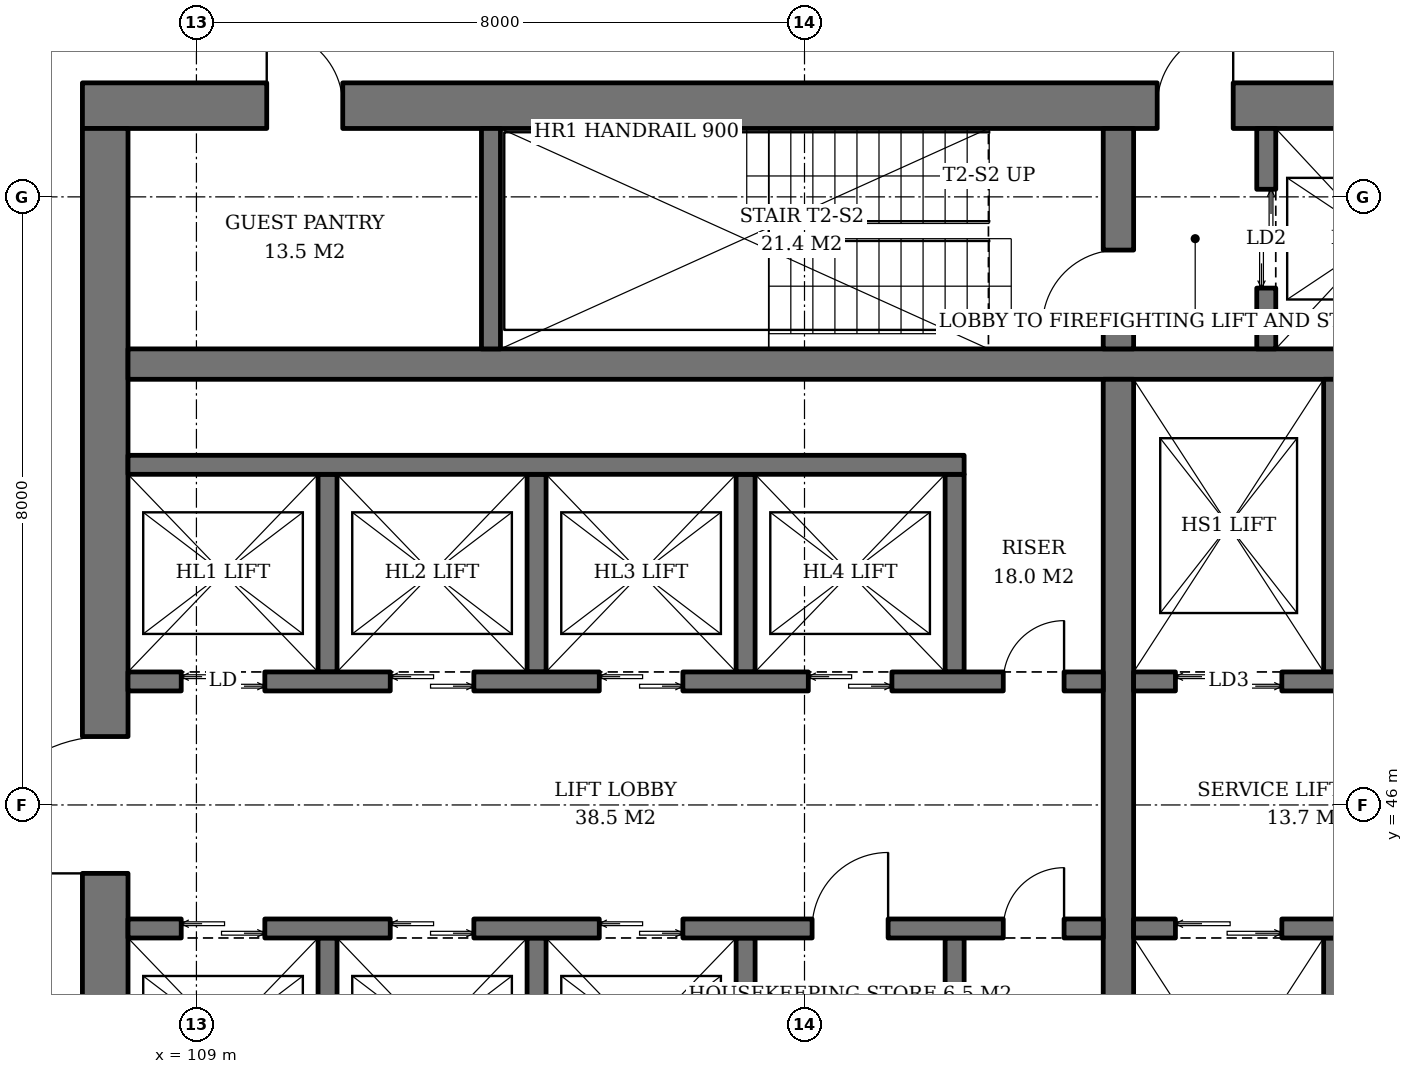
"""IFC4 building model, lengths in metres.
Left out: names, types, materials, properties, quantities, classifications, styles, units other than length and angle.
Written with IfcOpenShell. Run it as: python <this file> out.ifc"""

import sys

from ifc_helpers import new_model, si_unit, direction, frame, frame_2d, origin, place, context, subcontext, project, spatial, rectangle, extrude, element, fill, save


model = new_model("IFC4")
c1 = context("Model", 3, precision=1e-05, world=origin(), true_north=direction((0.0, 1.0)))
c2 = subcontext(c1, "Body", "Model", "MODEL_VIEW")
j1 = project(units=[si_unit("LENGTHUNIT", "METRE"), si_unit("PLANEANGLEUNIT", "RADIAN")], contexts=[c1])
p1 = place(None, origin())
s1 = spatial("IfcSite", under=j1, at=p1, CompositionType="ELEMENT")
p2 = place(p1, origin())
s2 = spatial("IfcBuilding", under=s1, at=p2, CompositionType="ELEMENT")
p3 = place(p2, frame((0.0, 0.0, 59.0)))
s3 = spatial("IfcBuildingStorey", under=s2, at=p3, CompositionType="ELEMENT", Elevation=59.0)
p4 = place(p3, frame((107.5, 55.2, 0.0), z_axis=(0.0, 0.0, 1.0), x_axis=(1.0, 0.0, 0.0)))
e1 = element("IfcWall", 1, at=p4, inside=s3, PredefinedType="SHEAR", context=c2, shape_type="SweptSolid", body=[
    extrude(rectangle(XDim=19.0, YDim=0.6, at=frame_2d((9.5, 0.0))), origin(), (0.0, 0.0, 1.0), 3.8),
])
p5 = place(p4, frame((14.14, 0.0, 0.0)))
e2 = element("IfcOpeningElement", 2, at=p5, cuts=e1, PredefinedType="OPENING", context=c2, shape_type="SweptSolid", body=[
    extrude(rectangle(XDim=1.0, YDim=2.1, at=frame_2d((0.5, 1.05))), frame((0.0, 0.31, 0.0), z_axis=(0.0, -1.0, 0.0), x_axis=(1.0, 0.0, 0.0)), (0.0, 0.0, 1.0), 0.62),
])
p6 = place(p4, frame((2.425, 0.0, 0.0)))
e3 = element("IfcOpeningElement", 3, at=p6, cuts=e1, PredefinedType="OPENING", context=c2, shape_type="SweptSolid", body=[
    extrude(rectangle(XDim=1.0, YDim=2.1, at=frame_2d((0.5, 1.05))), frame((0.0, 0.31, 0.0), z_axis=(0.0, -1.0, 0.0), x_axis=(1.0, 0.0, 0.0)), (0.0, 0.0, 1.0), 0.62),
])
p7 = place(p3, frame((107.8, 37.1, 0.0), z_axis=(0.0, 0.0, 1.0), x_axis=(0.0, 1.0, 0.0)))
e4 = element("IfcWall", 4, at=p7, inside=s3, PredefinedType="SHEAR", context=c2, shape_type="SweptSolid", body=[
    extrude(rectangle(XDim=17.8, YDim=0.6, at=frame_2d((8.9, 0.0))), origin(), (0.0, 0.0, 1.0), 3.8),
])
p8 = place(p7, frame((8.0, 0.0, 0.0)))
e5 = element("IfcOpeningElement", 5, at=p8, cuts=e4, PredefinedType="OPENING", context=c2, shape_type="SweptSolid", body=[
    extrude(rectangle(XDim=1.8, YDim=2.4, at=frame_2d((0.9, 1.2))), frame((0.0, 0.31, 0.0), z_axis=(0.0, -1.0, 0.0), x_axis=(1.0, 0.0, 0.0)), (0.0, 0.0, 1.0), 0.62),
])
p9 = place(p3, frame((108.1, 51.8, 0.0), z_axis=(0.0, 0.0, 1.0), x_axis=(1.0, 0.0, 0.0)))
e6 = element("IfcWall", 6, at=p9, inside=s3, PredefinedType="SHEAR", context=c2, shape_type="SweptSolid", body=[
    extrude(rectangle(XDim=17.8, YDim=0.4, at=frame_2d((8.9, 0.0))), origin(), (0.0, 0.0, 1.0), 3.8),
])
p10 = place(p3, frame((121.13, 40.4, 0.0), z_axis=(0.0, 0.0, 1.0), x_axis=(0.0, 1.0, 0.0)))
e7 = element("IfcWall", 7, at=p10, inside=s3, PredefinedType="SHEAR", context=c2, shape_type="SweptSolid", body=[
    extrude(rectangle(XDim=11.2, YDim=0.4, at=frame_2d((5.6, 0.0))), origin(), (0.0, 0.0, 1.0), 3.8),
])
p11 = place(p3, frame((121.13, 52.0, 0.0), z_axis=(0.0, 0.0, 1.0), x_axis=(0.0, 1.0, 0.0)))
e8 = element("IfcWall", 8, at=p11, inside=s3, PredefinedType="SHEAR", context=c2, shape_type="SweptSolid", body=[
    extrude(rectangle(XDim=2.9, YDim=0.4, at=frame_2d((1.45, 0.0))), origin(), (0.0, 0.0, 1.0), 3.8),
])
p12 = place(p11, frame((0.3, 0.0, 0.0)))
e9 = element("IfcOpeningElement", 9, at=p12, cuts=e8, PredefinedType="OPENING", context=c2, shape_type="SweptSolid", body=[
    extrude(rectangle(XDim=1.0, YDim=2.1, at=frame_2d((0.5, 1.05))), frame((0.0, 0.21, 0.0), z_axis=(0.0, -1.0, 0.0), x_axis=(1.0, 0.0, 0.0)), (0.0, 0.0, 1.0), 0.42),
])
p13 = place(p3, frame((112.875, 52.0, 0.0), z_axis=(0.0, 0.0, 1.0), x_axis=(0.0, 1.0, 0.0)))
e10 = element("IfcWall", 10, at=p13, inside=s3, PredefinedType="SHEAR", context=c2, shape_type="SweptSolid", body=[
    extrude(rectangle(XDim=2.9, YDim=0.25, at=frame_2d((1.45, 0.0))), origin(), (0.0, 0.0, 1.0), 3.8),
])
p14 = place(p3, frame((123.075, 52.0, 0.0), z_axis=(0.0, 0.0, 1.0), x_axis=(0.0, 1.0, 0.0)))
e11 = element("IfcWall", 11, at=p14, inside=s3, PredefinedType="SHEAR", context=c2, shape_type="SweptSolid", body=[
    extrude(rectangle(XDim=2.9, YDim=0.25, at=frame_2d((1.45, 0.0))), origin(), (0.0, 0.0, 1.0), 3.8),
])
p15 = place(p14, frame((0.8, 0.0, 0.0)))
e12 = element("IfcOpeningElement", 12, at=p15, cuts=e11, PredefinedType="OPENING", context=c2, shape_type="SweptSolid", body=[
    extrude(rectangle(XDim=1.3, YDim=2.2, at=frame_2d((0.65, 1.1))), frame((0.0, 0.135, 0.0), z_axis=(0.0, -1.0, 0.0), x_axis=(1.0, 0.0, 0.0)), (0.0, 0.0, 1.0), 0.27),
])
for number, where, z_axis, x_axis in (
    (13, (110.725, 47.75, 0.0), (0.0, 0.0, 1.0), (0.0, 1.0, 0.0)),
    (14, (113.475, 47.75, 0.0), (0.0, 0.0, 1.0), (0.0, 1.0, 0.0)),
    (15, (116.225, 47.75, 0.0), (0.0, 0.0, 1.0), (0.0, 1.0, 0.0)),
    (16, (118.975, 47.75, 0.0), (0.0, 0.0, 1.0), (0.0, 1.0, 0.0)),
):
    element("IfcWall", number, at=place(p3, frame(where, z_axis=z_axis, x_axis=x_axis)), inside=s3, PredefinedType="SHEAR", context=c2, shape_type="SweptSolid", body=[
        extrude(rectangle(XDim=2.6, YDim=0.25, at=frame_2d((1.3, 0.0))), origin(), (0.0, 0.0, 1.0), 3.8),
    ])
p16 = place(p3, frame((108.1, 50.475, 0.0), z_axis=(0.0, 0.0, 1.0), x_axis=(1.0, 0.0, 0.0)))
e17 = element("IfcWall", 17, at=p16, inside=s3, PredefinedType="SHEAR", context=c2, shape_type="SweptSolid", body=[
    extrude(rectangle(XDim=11.0, YDim=0.25, at=frame_2d((5.5, 0.0))), origin(), (0.0, 0.0, 1.0), 3.8),
])
p17 = place(p3, frame((108.1, 47.625, 0.0), z_axis=(0.0, 0.0, 1.0), x_axis=(1.0, 0.0, 0.0)))
e18 = element("IfcWall", 18, at=p17, inside=s3, PredefinedType="SHEAR", context=c2, shape_type="SweptSolid", body=[
    extrude(rectangle(XDim=12.83, YDim=0.25, at=frame_2d((6.415, 0.0))), origin(), (0.0, 0.0, 1.0), 3.8),
])
p18 = place(p17, frame((0.7, 0.0, 0.0)))
e19 = element("IfcOpeningElement", 19, at=p18, cuts=e18, PredefinedType="OPENING", context=c2, shape_type="SweptSolid", body=[
    extrude(rectangle(XDim=1.1, YDim=2.2, at=frame_2d((0.55, 1.1))), frame((0.0, 0.135, 0.0), z_axis=(0.0, -1.0, 0.0), x_axis=(1.0, 0.0, 0.0)), (0.0, 0.0, 1.0), 0.27),
])
p19 = place(p17, frame((3.45, 0.0, 0.0)))
e20 = element("IfcOpeningElement", 20, at=p19, cuts=e18, PredefinedType="OPENING", context=c2, shape_type="SweptSolid", body=[
    extrude(rectangle(XDim=1.1, YDim=2.2, at=frame_2d((0.55, 1.1))), frame((0.0, 0.135, 0.0), z_axis=(0.0, -1.0, 0.0), x_axis=(1.0, 0.0, 0.0)), (0.0, 0.0, 1.0), 0.27),
])
p20 = place(p17, frame((6.2, 0.0, 0.0)))
e21 = element("IfcOpeningElement", 21, at=p20, cuts=e18, PredefinedType="OPENING", context=c2, shape_type="SweptSolid", body=[
    extrude(rectangle(XDim=1.1, YDim=2.2, at=frame_2d((0.55, 1.1))), frame((0.0, 0.135, 0.0), z_axis=(0.0, -1.0, 0.0), x_axis=(1.0, 0.0, 0.0)), (0.0, 0.0, 1.0), 0.27),
])
p21 = place(p17, frame((8.95, 0.0, 0.0)))
e22 = element("IfcOpeningElement", 22, at=p21, cuts=e18, PredefinedType="OPENING", context=c2, shape_type="SweptSolid", body=[
    extrude(rectangle(XDim=1.1, YDim=2.2, at=frame_2d((0.55, 1.1))), frame((0.0, 0.135, 0.0), z_axis=(0.0, -1.0, 0.0), x_axis=(1.0, 0.0, 0.0)), (0.0, 0.0, 1.0), 0.27),
])
p22 = place(p17, frame((11.515, 0.0, 0.0)))
e23 = element("IfcOpeningElement", 23, at=p22, cuts=e18, PredefinedType="OPENING", context=c2, shape_type="SweptSolid", body=[
    extrude(rectangle(XDim=0.8, YDim=2.0, at=frame_2d((0.4, 1.0))), frame((0.0, 0.135, 0.0), z_axis=(0.0, -1.0, 0.0), x_axis=(1.0, 0.0, 0.0)), (0.0, 0.0, 1.0), 0.27),
])
for number, where, z_axis, x_axis in (
    (24, (110.725, 44.25, 0.0), (0.0, 0.0, 1.0), (0.0, -1.0, 0.0)),
    (25, (113.475, 44.25, 0.0), (0.0, 0.0, 1.0), (0.0, -1.0, 0.0)),
    (26, (116.225, 44.25, 0.0), (0.0, 0.0, 1.0), (0.0, -1.0, 0.0)),
    (27, (118.975, 44.25, 0.0), (0.0, 0.0, 1.0), (0.0, -1.0, 0.0)),
):
    element("IfcWall", number, at=place(p3, frame(where, z_axis=z_axis, x_axis=x_axis)), inside=s3, PredefinedType="SHEAR", context=c2, shape_type="SweptSolid", body=[
        extrude(rectangle(XDim=2.6, YDim=0.25, at=frame_2d((1.3, 0.0))), origin(), (0.0, 0.0, 1.0), 3.8),
    ])
p23 = place(p3, frame((108.1, 44.375, 0.0), z_axis=(0.0, 0.0, 1.0), x_axis=(1.0, 0.0, 0.0)))
e28 = element("IfcWall", 28, at=p23, inside=s3, PredefinedType="SHEAR", context=c2, shape_type="SweptSolid", body=[
    extrude(rectangle(XDim=12.83, YDim=0.25, at=frame_2d((6.415, 0.0))), origin(), (0.0, 0.0, 1.0), 3.8),
])
p24 = place(p23, frame((0.7, 0.0, 0.0)))
e29 = element("IfcOpeningElement", 29, at=p24, cuts=e28, PredefinedType="OPENING", context=c2, shape_type="SweptSolid", body=[
    extrude(rectangle(XDim=1.1, YDim=2.2, at=frame_2d((0.55, 1.1))), frame((0.0, 0.135, 0.0), z_axis=(0.0, -1.0, 0.0), x_axis=(1.0, 0.0, 0.0)), (0.0, 0.0, 1.0), 0.27),
])
p25 = place(p23, frame((3.45, 0.0, 0.0)))
e30 = element("IfcOpeningElement", 30, at=p25, cuts=e28, PredefinedType="OPENING", context=c2, shape_type="SweptSolid", body=[
    extrude(rectangle(XDim=1.1, YDim=2.2, at=frame_2d((0.55, 1.1))), frame((0.0, 0.135, 0.0), z_axis=(0.0, -1.0, 0.0), x_axis=(1.0, 0.0, 0.0)), (0.0, 0.0, 1.0), 0.27),
])
p26 = place(p23, frame((6.2, 0.0, 0.0)))
e31 = element("IfcOpeningElement", 31, at=p26, cuts=e28, PredefinedType="OPENING", context=c2, shape_type="SweptSolid", body=[
    extrude(rectangle(XDim=1.1, YDim=2.2, at=frame_2d((0.55, 1.1))), frame((0.0, 0.135, 0.0), z_axis=(0.0, -1.0, 0.0), x_axis=(1.0, 0.0, 0.0)), (0.0, 0.0, 1.0), 0.27),
])
p27 = place(p23, frame((9.0, 0.0, 0.0)))
e32 = element("IfcOpeningElement", 32, at=p27, cuts=e28, PredefinedType="OPENING", context=c2, shape_type="SweptSolid", body=[
    extrude(rectangle(XDim=1.0, YDim=2.1, at=frame_2d((0.5, 1.05))), frame((0.0, 0.135, 0.0), z_axis=(0.0, -1.0, 0.0), x_axis=(1.0, 0.0, 0.0)), (0.0, 0.0, 1.0), 0.27),
])
p28 = place(p23, frame((11.515, 0.0, 0.0)))
e33 = element("IfcOpeningElement", 33, at=p28, cuts=e28, PredefinedType="OPENING", context=c2, shape_type="SweptSolid", body=[
    extrude(rectangle(XDim=0.8, YDim=2.0, at=frame_2d((0.4, 1.0))), frame((0.0, 0.135, 0.0), z_axis=(0.0, -1.0, 0.0), x_axis=(1.0, 0.0, 0.0)), (0.0, 0.0, 1.0), 0.27),
])
p29 = place(p3, frame((123.955, 47.75, 0.0), z_axis=(0.0, 0.0, 1.0), x_axis=(0.0, 1.0, 0.0)))
e34 = element("IfcWall", 34, at=p29, inside=s3, PredefinedType="SHEAR", context=c2, shape_type="SweptSolid", body=[
    extrude(rectangle(XDim=3.85, YDim=0.25, at=frame_2d((1.925, 0.0))), origin(), (0.0, 0.0, 1.0), 3.8),
])
p30 = place(p3, frame((121.33, 47.625, 0.0), z_axis=(0.0, 0.0, 1.0), x_axis=(1.0, 0.0, 0.0)))
e35 = element("IfcWall", 35, at=p30, inside=s3, PredefinedType="SHEAR", context=c2, shape_type="SweptSolid", body=[
    extrude(rectangle(XDim=4.57, YDim=0.25, at=frame_2d((2.285, 0.0))), origin(), (0.0, 0.0, 1.0), 3.8),
])
p31 = place(p30, frame((0.55, 0.0, 0.0)))
e36 = element("IfcOpeningElement", 36, at=p31, cuts=e35, PredefinedType="OPENING", context=c2, shape_type="SweptSolid", body=[
    extrude(rectangle(XDim=1.4, YDim=2.4, at=frame_2d((0.7, 1.2))), frame((0.0, 0.135, 0.0), z_axis=(0.0, -1.0, 0.0), x_axis=(1.0, 0.0, 0.0)), (0.0, 0.0, 1.0), 0.27),
])
p32 = place(p30, frame((3.26, 0.0, 0.0)))
e37 = element("IfcOpeningElement", 37, at=p32, cuts=e35, PredefinedType="OPENING", context=c2, shape_type="SweptSolid", body=[
    extrude(rectangle(XDim=0.8, YDim=2.0, at=frame_2d((0.4, 1.0))), frame((0.0, 0.135, 0.0), z_axis=(0.0, -1.0, 0.0), x_axis=(1.0, 0.0, 0.0)), (0.0, 0.0, 1.0), 0.27),
])
p33 = place(p3, frame((123.955, 44.25, 0.0), z_axis=(0.0, 0.0, 1.0), x_axis=(0.0, -1.0, 0.0)))
e38 = element("IfcWall", 38, at=p33, inside=s3, PredefinedType="SHEAR", context=c2, shape_type="SweptSolid", body=[
    extrude(rectangle(XDim=3.85, YDim=0.25, at=frame_2d((1.925, 0.0))), origin(), (0.0, 0.0, 1.0), 3.8),
])
p34 = place(p3, frame((121.33, 44.375, 0.0), z_axis=(0.0, 0.0, 1.0), x_axis=(1.0, 0.0, 0.0)))
e39 = element("IfcWall", 39, at=p34, inside=s3, PredefinedType="SHEAR", context=c2, shape_type="SweptSolid", body=[
    extrude(rectangle(XDim=4.57, YDim=0.25, at=frame_2d((2.285, 0.0))), origin(), (0.0, 0.0, 1.0), 3.8),
])
p35 = place(p34, frame((0.55, 0.0, 0.0)))
e40 = element("IfcOpeningElement", 40, at=p35, cuts=e39, PredefinedType="OPENING", context=c2, shape_type="SweptSolid", body=[
    extrude(rectangle(XDim=1.4, YDim=2.4, at=frame_2d((0.7, 1.2))), frame((0.0, 0.135, 0.0), z_axis=(0.0, -1.0, 0.0), x_axis=(1.0, 0.0, 0.0)), (0.0, 0.0, 1.0), 0.27),
])
p36 = place(p34, frame((3.26, 0.0, 0.0)))
e41 = element("IfcOpeningElement", 41, at=p36, cuts=e39, PredefinedType="OPENING", context=c2, shape_type="SweptSolid", body=[
    extrude(rectangle(XDim=0.8, YDim=2.0, at=frame_2d((0.4, 1.0))), frame((0.0, 0.135, 0.0), z_axis=(0.0, -1.0, 0.0), x_axis=(1.0, 0.0, 0.0)), (0.0, 0.0, 1.0), 0.27),
])
p37 = place(p15, origin())
e42 = element("IfcDoor", 42, at=p37, inside=s3, OperationType="DOUBLE_DOOR_SLIDING", PredefinedType="DOOR", context=c2, shape_type="SweptSolid", body=[
    extrude(rectangle(XDim=1.3, YDim=2.2, at=frame_2d((0.65, 1.1))), frame((0.0, 0.025, 0.0), z_axis=(0.0, -1.0, 0.0), x_axis=(1.0, 0.0, 0.0)), (0.0, 0.0, 1.0), 0.05),
])
fill(e12, e42)
p38 = place(p18, origin())
e43 = element("IfcDoor", 43, at=p38, inside=s3, OperationType="DOUBLE_DOOR_SLIDING", PredefinedType="DOOR", context=c2, shape_type="SweptSolid", body=[
    extrude(rectangle(XDim=1.1, YDim=2.2, at=frame_2d((0.55, 1.1))), frame((0.0, 0.025, 0.0), z_axis=(0.0, -1.0, 0.0), x_axis=(1.0, 0.0, 0.0)), (0.0, 0.0, 1.0), 0.05),
])
fill(e19, e43)
p39 = place(p19, origin())
e44 = element("IfcDoor", 44, at=p39, inside=s3, OperationType="DOUBLE_DOOR_SLIDING", PredefinedType="DOOR", context=c2, shape_type="SweptSolid", body=[
    extrude(rectangle(XDim=1.1, YDim=2.2, at=frame_2d((0.55, 1.1))), frame((0.0, 0.025, 0.0), z_axis=(0.0, -1.0, 0.0), x_axis=(1.0, 0.0, 0.0)), (0.0, 0.0, 1.0), 0.05),
])
fill(e20, e44)
p40 = place(p20, origin())
e45 = element("IfcDoor", 45, at=p40, inside=s3, OperationType="DOUBLE_DOOR_SLIDING", PredefinedType="DOOR", context=c2, shape_type="SweptSolid", body=[
    extrude(rectangle(XDim=1.1, YDim=2.2, at=frame_2d((0.55, 1.1))), frame((0.0, 0.025, 0.0), z_axis=(0.0, -1.0, 0.0), x_axis=(1.0, 0.0, 0.0)), (0.0, 0.0, 1.0), 0.05),
])
fill(e21, e45)
p41 = place(p21, origin())
e46 = element("IfcDoor", 46, at=p41, inside=s3, OperationType="DOUBLE_DOOR_SLIDING", PredefinedType="DOOR", context=c2, shape_type="SweptSolid", body=[
    extrude(rectangle(XDim=1.1, YDim=2.2, at=frame_2d((0.55, 1.1))), frame((0.0, 0.025, 0.0), z_axis=(0.0, -1.0, 0.0), x_axis=(1.0, 0.0, 0.0)), (0.0, 0.0, 1.0), 0.05),
])
fill(e22, e46)
p42 = place(p22, origin())
e47 = element("IfcDoor", 47, at=p42, inside=s3, OperationType="SINGLE_SWING_RIGHT", PredefinedType="DOOR", context=c2, shape_type="SweptSolid", body=[
    extrude(rectangle(XDim=0.8, YDim=2.0, at=frame_2d((0.4, 1.0))), frame((0.0, 0.025, 0.0), z_axis=(0.0, -1.0, 0.0), x_axis=(1.0, 0.0, 0.0)), (0.0, 0.0, 1.0), 0.05),
])
fill(e23, e47)
p43 = place(p24, origin())
e48 = element("IfcDoor", 48, at=p43, inside=s3, OperationType="DOUBLE_DOOR_SLIDING", PredefinedType="DOOR", context=c2, shape_type="SweptSolid", body=[
    extrude(rectangle(XDim=1.1, YDim=2.2, at=frame_2d((0.55, 1.1))), frame((0.0, 0.025, 0.0), z_axis=(0.0, -1.0, 0.0), x_axis=(1.0, 0.0, 0.0)), (0.0, 0.0, 1.0), 0.05),
])
fill(e29, e48)
p44 = place(p25, origin())
e49 = element("IfcDoor", 49, at=p44, inside=s3, OperationType="DOUBLE_DOOR_SLIDING", PredefinedType="DOOR", context=c2, shape_type="SweptSolid", body=[
    extrude(rectangle(XDim=1.1, YDim=2.2, at=frame_2d((0.55, 1.1))), frame((0.0, 0.025, 0.0), z_axis=(0.0, -1.0, 0.0), x_axis=(1.0, 0.0, 0.0)), (0.0, 0.0, 1.0), 0.05),
])
fill(e30, e49)
p45 = place(p26, origin())
e50 = element("IfcDoor", 50, at=p45, inside=s3, OperationType="DOUBLE_DOOR_SLIDING", PredefinedType="DOOR", context=c2, shape_type="SweptSolid", body=[
    extrude(rectangle(XDim=1.1, YDim=2.2, at=frame_2d((0.55, 1.1))), frame((0.0, 0.025, 0.0), z_axis=(0.0, -1.0, 0.0), x_axis=(1.0, 0.0, 0.0)), (0.0, 0.0, 1.0), 0.05),
])
fill(e31, e50)
p46 = place(p27, origin())
e51 = element("IfcDoor", 51, at=p46, inside=s3, OperationType="SINGLE_SWING_RIGHT", PredefinedType="DOOR", context=c2, shape_type="SweptSolid", body=[
    extrude(rectangle(XDim=1.0, YDim=2.1, at=frame_2d((0.5, 1.05))), frame((0.0, 0.025, 0.0), z_axis=(0.0, -1.0, 0.0), x_axis=(1.0, 0.0, 0.0)), (0.0, 0.0, 1.0), 0.05),
])
fill(e32, e51)
p47 = place(p28, origin())
e52 = element("IfcDoor", 52, at=p47, inside=s3, OperationType="SINGLE_SWING_RIGHT", PredefinedType="DOOR", context=c2, shape_type="SweptSolid", body=[
    extrude(rectangle(XDim=0.8, YDim=2.0, at=frame_2d((0.4, 1.0))), frame((0.0, 0.025, 0.0), z_axis=(0.0, -1.0, 0.0), x_axis=(1.0, 0.0, 0.0)), (0.0, 0.0, 1.0), 0.05),
])
fill(e33, e52)
p48 = place(p31, origin())
e53 = element("IfcDoor", 53, at=p48, inside=s3, OperationType="DOUBLE_DOOR_SLIDING", PredefinedType="DOOR", context=c2, shape_type="SweptSolid", body=[
    extrude(rectangle(XDim=1.4, YDim=2.4, at=frame_2d((0.7, 1.2))), frame((0.0, 0.025, 0.0), z_axis=(0.0, -1.0, 0.0), x_axis=(1.0, 0.0, 0.0)), (0.0, 0.0, 1.0), 0.05),
])
fill(e36, e53)
p49 = place(p35, origin())
e54 = element("IfcDoor", 54, at=p49, inside=s3, OperationType="DOUBLE_DOOR_SLIDING", PredefinedType="DOOR", context=c2, shape_type="SweptSolid", body=[
    extrude(rectangle(XDim=1.4, YDim=2.4, at=frame_2d((0.7, 1.2))), frame((0.0, 0.025, 0.0), z_axis=(0.0, -1.0, 0.0), x_axis=(1.0, 0.0, 0.0)), (0.0, 0.0, 1.0), 0.05),
])
fill(e40, e54)
p50 = place(p12, origin())
e55 = element("IfcDoor", 55, at=p50, inside=s3, OperationType="SINGLE_SWING_LEFT", PredefinedType="DOOR", context=c2, shape_type="SweptSolid", body=[
    extrude(rectangle(XDim=1.0, YDim=2.1, at=frame_2d((0.5, 1.05))), frame((0.0, 0.025, 0.0), z_axis=(0.0, -1.0, 0.0), x_axis=(1.0, 0.0, 0.0)), (0.0, 0.0, 1.0), 0.05),
])
fill(e9, e55)
p51 = place(p5, origin())
e56 = element("IfcDoor", 56, at=p51, inside=s3, OperationType="SINGLE_SWING_RIGHT", PredefinedType="DOOR", context=c2, shape_type="SweptSolid", body=[
    extrude(rectangle(XDim=1.0, YDim=2.1, at=frame_2d((0.5, 1.05))), frame((0.0, 0.025, 0.0), z_axis=(0.0, -1.0, 0.0), x_axis=(1.0, 0.0, 0.0)), (0.0, 0.0, 1.0), 0.05),
])
fill(e2, e56)
p52 = place(p8, origin())
e57 = element("IfcDoor", 57, at=p52, inside=s3, OperationType="DOUBLE_DOOR_SINGLE_SWING", PredefinedType="DOOR", context=c2, shape_type="SweptSolid", body=[
    extrude(rectangle(XDim=1.8, YDim=2.4, at=frame_2d((0.9, 1.2))), frame((0.0, 0.025, 0.0), z_axis=(0.0, -1.0, 0.0), x_axis=(1.0, 0.0, 0.0)), (0.0, 0.0, 1.0), 0.05),
])
fill(e5, e57)
p53 = place(p6, origin())
e58 = element("IfcDoor", 58, at=p53, inside=s3, OperationType="SINGLE_SWING_LEFT", PredefinedType="DOOR", context=c2, shape_type="SweptSolid", body=[
    extrude(rectangle(XDim=1.0, YDim=2.1, at=frame_2d((0.5, 1.05))), frame((0.0, -0.24, 0.0), z_axis=(0.0, -1.0, 0.0), x_axis=(1.0, 0.0, 0.0)), (0.0, 0.0, 1.0), 0.05),
])
fill(e3, e58)
save(model, sys.argv[1])
